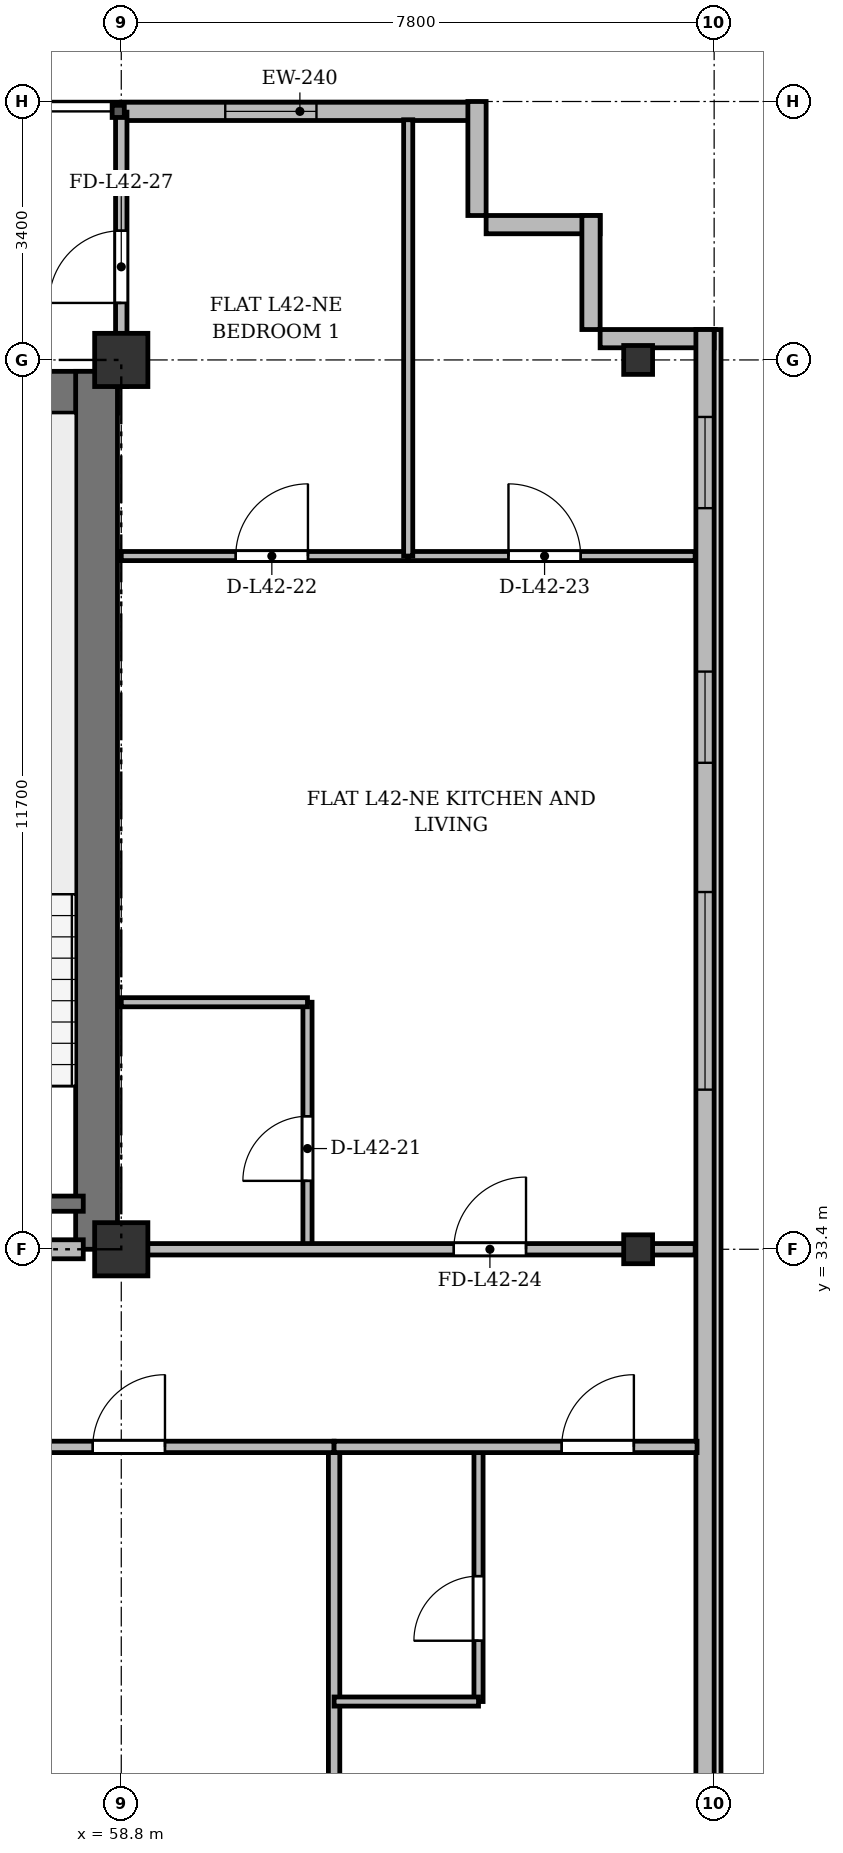
"""IFC4 building model, lengths in metres.
Left out: names, types, materials, properties, quantities, classifications, styles, units other than length and angle.
Written with IfcOpenShell. Run it as: python <this file> out.ifc"""

import sys

from ifc_helpers import new_model, si_unit, direction, frame, frame_2d, origin, origin_2d, place, context, subcontext, project, spatial, rectangle, i_section, extrude, source, transform, mapped, element, fill, save


model = new_model("IFC4")
c1 = context("Model", 3, precision=1e-05, world=origin(), true_north=direction((0.0, 1.0)))
c2 = subcontext(c1, "Body", "Model", "MODEL_VIEW")
j1 = project(units=[si_unit("LENGTHUNIT", "METRE"), si_unit("PLANEANGLEUNIT", "RADIAN")], contexts=[c1])
p1 = place(None, origin())
s1 = spatial("IfcSite", under=j1, at=p1, CompositionType="ELEMENT")
p2 = place(p1, origin())
s2 = spatial("IfcBuilding", under=s1, at=p2, CompositionType="ELEMENT")
p3 = place(p2, frame((0.0, 0.0, 160.9)))
s3 = spatial("IfcBuildingStorey", under=s2, at=p3, CompositionType="ELEMENT", Elevation=160.9)
m1 = source(origin(), c2, "Body", "SweptSolid", [
    extrude(rectangle(XDim=0.7, YDim=0.7, at=origin_2d()), origin(), (0.0, 0.0, 1.0), 3.6),
])
for number, where, z_axis, x_axis in (
    (1, (58.8, 33.4, 0.0), (0.0, 0.0, 1.0), (1.0, 0.0, 0.0)),
    (2, (58.8, 45.1, 0.0), (0.0, 0.0, 1.0), (1.0, 0.0, 0.0)),
):
    element("IfcColumn", number, at=place(p3, frame(where, z_axis=z_axis, x_axis=x_axis)), inside=s3, PredefinedType="COLUMN", context=c2, shape_type="MappedRepresentation", body=[
        mapped(m1, transform((0.0, 0.0, 0.0), x_axis=(1.0, 0.0, 0.0), y_axis=(0.0, 1.0, 0.0), z_axis=(0.0, 0.0, 1.0), scale=1.0)),
    ])
m2 = source(origin(), c2, "Body", "SweptSolid", [
    extrude(i_section(OverallWidth=0.38, OverallDepth=0.38, WebThickness=0.02, FlangeThickness=0.03, at=origin_2d()), origin(), (0.0, 0.0, 1.0), 3.6),
])
for number, where, z_axis, x_axis in (
    (3, (65.6, 33.4, 0.0), (0.0, 0.0, 1.0), (1.0, 0.0, 0.0)),
    (4, (65.6, 45.1, 0.0), (0.0, 0.0, 1.0), (1.0, 0.0, 0.0)),
):
    element("IfcColumn", number, at=place(p3, frame(where, z_axis=z_axis, x_axis=x_axis)), inside=s3, PredefinedType="COLUMN", context=c2, shape_type="MappedRepresentation", body=[
        mapped(m2, transform((0.0, 0.0, 0.0), x_axis=(1.0, 0.0, 0.0), y_axis=(0.0, 1.0, 0.0), z_axis=(0.0, 0.0, 1.0), scale=1.0)),
    ])
p4 = place(p3, frame((58.8, 48.37, 0.0), z_axis=(0.0, 0.0, 1.0), x_axis=(1.0, 0.0, 0.0)))
e5 = element("IfcWall", 5, at=p4, inside=s3, PredefinedType="SOLIDWALL", context=c2, shape_type="SweptSolid", body=[
    extrude(rectangle(XDim=4.7, YDim=0.24, at=frame_2d((2.35, 0.0))), origin(), (0.0, 0.0, 1.0), 3.35),
])
p5 = place(p4, frame((1.368, 0.0, 0.9)))
e6 = element("IfcOpeningElement", 6, at=p5, cuts=e5, PredefinedType="OPENING", context=c2, shape_type="SweptSolid", body=[
    extrude(rectangle(XDim=1.2, YDim=1.65, at=frame_2d((0.6, 0.825))), frame((0.0, 0.13, 0.0), z_axis=(0.0, -1.0, 0.0), x_axis=(1.0, 0.0, 0.0)), (0.0, 0.0, 1.0), 0.26),
])
for number, where, z_axis, x_axis in (
    (7, (63.48, 48.5, 0.0), (0.0, 0.0, 1.0), (0.0, -1.0, 0.0)),
    (8, (63.6, 46.88, 0.0), (0.0, 0.0, 1.0), (1.0, 0.0, 0.0)),
    (9, (64.98, 47.0, 0.0), (0.0, 0.0, 1.0), (0.0, -1.0, 0.0)),
    (10, (65.1, 45.38, 0.0), (0.0, 0.0, 1.0), (1.0, 0.0, 0.0)),
):
    element("IfcWall", number, at=place(p3, frame(where, z_axis=z_axis, x_axis=x_axis)), inside=s3, PredefinedType="SOLIDWALL", context=c2, shape_type="SweptSolid", body=[
        extrude(rectangle(XDim=1.5, YDim=0.24, at=frame_2d((0.75, 0.0))), origin(), (0.0, 0.0, 1.0), 3.35),
    ])
p6 = place(p3, frame((66.48, 45.5, 0.0), z_axis=(0.0, 0.0, 1.0), x_axis=(0.0, -1.0, 0.0)))
e11 = element("IfcWall", 11, at=p6, inside=s3, PredefinedType="SOLIDWALL", context=c2, shape_type="SweptSolid", body=[
    extrude(rectangle(XDim=39.2, YDim=0.24, at=frame_2d((19.6, 0.0))), origin(), (0.0, 0.0, 1.0), 3.35),
])
p7 = place(p6, frame((36.55, 0.0, 0.92)))
e12 = element("IfcOpeningElement", 12, at=p7, cuts=e11, PredefinedType="OPENING", context=c2, shape_type="SweptSolid", body=[
    extrude(rectangle(XDim=1.2, YDim=1.65, at=frame_2d((0.6, 0.825))), frame((0.0, 0.13, 0.0), z_axis=(0.0, -1.0, 0.0), x_axis=(1.0, 0.0, 0.0)), (0.0, 0.0, 1.0), 0.26),
])
p8 = place(p6, frame((32.8, 0.0, 0.92)))
e13 = element("IfcOpeningElement", 13, at=p8, cuts=e11, PredefinedType="OPENING", context=c2, shape_type="SweptSolid", body=[
    extrude(rectangle(XDim=2.6, YDim=1.9, at=frame_2d((1.3, 0.95))), frame((0.0, 0.13, 0.0), z_axis=(0.0, -1.0, 0.0), x_axis=(1.0, 0.0, 0.0)), (0.0, 0.0, 1.0), 0.26),
])
p9 = place(p6, frame((28.6, 0.0, 0.92)))
e14 = element("IfcOpeningElement", 14, at=p9, cuts=e11, PredefinedType="OPENING", context=c2, shape_type="SweptSolid", body=[
    extrude(rectangle(XDim=2.6, YDim=1.9, at=frame_2d((1.3, 0.95))), frame((0.0, 0.13, 0.0), z_axis=(0.0, -1.0, 0.0), x_axis=(1.0, 0.0, 0.0)), (0.0, 0.0, 1.0), 0.26),
])
p10 = place(p6, frame((21.4, 0.0, 0.92)))
e15 = element("IfcOpeningElement", 15, at=p10, cuts=e11, PredefinedType="OPENING", context=c2, shape_type="SweptSolid", body=[
    extrude(rectangle(XDim=2.6, YDim=1.9, at=frame_2d((1.3, 0.95))), frame((0.0, 0.13, 0.0), z_axis=(0.0, -1.0, 0.0), x_axis=(1.0, 0.0, 0.0)), (0.0, 0.0, 1.0), 0.26),
])
p11 = place(p6, frame((7.4, 0.0, 0.92)))
e16 = element("IfcOpeningElement", 16, at=p11, cuts=e11, PredefinedType="OPENING", context=c2, shape_type="SweptSolid", body=[
    extrude(rectangle(XDim=2.6, YDim=1.9, at=frame_2d((1.3, 0.95))), frame((0.0, 0.13, 0.0), z_axis=(0.0, -1.0, 0.0), x_axis=(1.0, 0.0, 0.0)), (0.0, 0.0, 1.0), 0.26),
])
p12 = place(p6, frame((4.5, 0.0, 0.92)))
e17 = element("IfcOpeningElement", 17, at=p12, cuts=e11, PredefinedType="OPENING", context=c2, shape_type="SweptSolid", body=[
    extrude(rectangle(XDim=1.2, YDim=1.65, at=frame_2d((0.6, 0.825))), frame((0.0, 0.13, 0.0), z_axis=(0.0, -1.0, 0.0), x_axis=(1.0, 0.0, 0.0)), (0.0, 0.0, 1.0), 0.26),
])
p13 = place(p6, frame((1.15, 0.0, 0.92)))
e18 = element("IfcOpeningElement", 18, at=p13, cuts=e11, PredefinedType="OPENING", context=c2, shape_type="SweptSolid", body=[
    extrude(rectangle(XDim=1.2, YDim=1.65, at=frame_2d((0.6, 0.825))), frame((0.0, 0.13, 0.0), z_axis=(0.0, -1.0, 0.0), x_axis=(1.0, 0.0, 0.0)), (0.0, 0.0, 1.0), 0.26),
])
p14 = place(p3, frame((15.65, 44.675, 0.0), z_axis=(0.0, 0.0, 1.0), x_axis=(1.0, 0.0, 0.0)))
e19 = element("IfcWall", 19, at=p14, inside=s3, PredefinedType="SHEAR", context=c2, shape_type="SweptSolid", body=[
    extrude(rectangle(XDim=43.1, YDim=0.55, at=frame_2d((21.55, 0.0))), origin(), (0.0, 0.0, 1.0), 3.35),
])
p15 = place(p3, frame((58.475, 33.4, 0.0), z_axis=(0.0, 0.0, 1.0), x_axis=(0.0, 1.0, 0.0)))
e20 = element("IfcWall", 20, at=p15, inside=s3, PredefinedType="SHEAR", context=c2, shape_type="SweptSolid", body=[
    extrude(rectangle(XDim=11.55, YDim=0.55, at=frame_2d((5.775, 0.0))), origin(), (0.0, 0.0, 1.0), 3.35),
])
p16 = place(p3, frame((54.9, 34.0, 0.0), z_axis=(0.0, 0.0, 1.0), x_axis=(1.0, 0.0, 0.0)))
e21 = element("IfcWall", 21, at=p16, inside=s3, PredefinedType="SHEAR", context=c2, shape_type="SweptSolid", body=[
    extrude(rectangle(XDim=3.4, YDim=0.2, at=frame_2d((1.7, 0.0))), origin(), (0.0, 0.0, 1.0), 3.35),
])
p17 = place(p3, frame((47.15, 33.4, 0.0), z_axis=(0.0, 0.0, 1.0), x_axis=(1.0, 0.0, 0.0)))
e22 = element("IfcWall", 22, at=p17, inside=s3, PredefinedType="PARTITIONING", context=c2, shape_type="SweptSolid", body=[
    extrude(rectangle(XDim=11.15, YDim=0.25, at=frame_2d((5.575, 0.0))), origin(), (0.0, 0.0, 1.0), 2.75),
])
p18 = place(p17, frame((0.7, 0.0, 0.0)))
e23 = element("IfcOpeningElement", 23, at=p18, cuts=e22, PredefinedType="OPENING", context=c2, shape_type="SweptSolid", body=[
    extrude(rectangle(XDim=0.95, YDim=2.15, at=frame_2d((0.475, 1.075))), frame((0.0, 0.135, 0.0), z_axis=(0.0, -1.0, 0.0), x_axis=(1.0, 0.0, 0.0)), (0.0, 0.0, 1.0), 0.27),
])
p19 = place(p17, frame((6.0, 0.0, 0.0)))
e24 = element("IfcOpeningElement", 24, at=p19, cuts=e22, PredefinedType="OPENING", context=c2, shape_type="SweptSolid", body=[
    extrude(rectangle(XDim=1.2, YDim=2.15, at=frame_2d((0.6, 1.075))), frame((0.0, 0.135, 0.0), z_axis=(0.0, -1.0, 0.0), x_axis=(1.0, 0.0, 0.0)), (0.0, 0.0, 1.0), 0.27),
])
p20 = place(p3, frame((61.25, 33.4, 0.0), z_axis=(0.0, 0.0, 1.0), x_axis=(0.0, 1.0, 0.0)))
e25 = element("IfcWall", 25, at=p20, inside=s3, PredefinedType="PARTITIONING", context=c2, shape_type="SweptSolid", body=[
    extrude(rectangle(XDim=3.25, YDim=0.12, at=frame_2d((1.625, 0.0))), origin(), (0.0, 0.0, 1.0), 2.75),
])
p21 = place(p20, frame((0.9, 0.0, 0.0)))
e26 = element("IfcOpeningElement", 26, at=p21, cuts=e25, PredefinedType="OPENING", context=c2, shape_type="SweptSolid", body=[
    extrude(rectangle(XDim=0.85, YDim=2.1, at=frame_2d((0.425, 1.05))), frame((0.0, 0.07, 0.0), z_axis=(0.0, -1.0, 0.0), x_axis=(1.0, 0.0, 0.0)), (0.0, 0.0, 1.0), 0.14),
])
p22 = place(p3, frame((58.8, 36.65, 0.0), z_axis=(0.0, 0.0, 1.0), x_axis=(1.0, 0.0, 0.0)))
e27 = element("IfcWall", 27, at=p22, inside=s3, PredefinedType="PARTITIONING", context=c2, shape_type="SweptSolid", body=[
    extrude(rectangle(XDim=2.45, YDim=0.12, at=frame_2d((1.225, 0.0))), origin(), (0.0, 0.0, 1.0), 2.85),
])
p23 = place(p3, frame((58.8, 42.52, 0.0), z_axis=(0.0, 0.0, 1.0), x_axis=(1.0, 0.0, 0.0)))
e28 = element("IfcWall", 28, at=p23, inside=s3, PredefinedType="PARTITIONING", context=c2, shape_type="SweptSolid", body=[
    extrude(rectangle(XDim=3.775, YDim=0.12, at=frame_2d((1.887, 0.0))), origin(), (0.0, 0.0, 1.0), 2.85),
])
p24 = place(p23, frame((1.506, 0.0, 0.0)))
e29 = element("IfcOpeningElement", 29, at=p24, cuts=e28, PredefinedType="OPENING", context=c2, shape_type="SweptSolid", body=[
    extrude(rectangle(XDim=0.95, YDim=2.15, at=frame_2d((0.475, 1.075))), frame((0.0, 0.07, 0.0), z_axis=(0.0, -1.0, 0.0), x_axis=(1.0, 0.0, 0.0)), (0.0, 0.0, 1.0), 0.14),
])
p25 = place(p3, frame((62.575, 42.52, 0.0), z_axis=(0.0, 0.0, 1.0), x_axis=(1.0, 0.0, 0.0)))
e30 = element("IfcWall", 30, at=p25, inside=s3, PredefinedType="PARTITIONING", context=c2, shape_type="SweptSolid", body=[
    extrude(rectangle(XDim=3.775, YDim=0.12, at=frame_2d((1.888, 0.0))), origin(), (0.0, 0.0, 1.0), 2.85),
])
p26 = place(p25, frame((1.319, 0.0, 0.0)))
e31 = element("IfcOpeningElement", 31, at=p26, cuts=e30, PredefinedType="OPENING", context=c2, shape_type="SweptSolid", body=[
    extrude(rectangle(XDim=0.95, YDim=2.15, at=frame_2d((0.475, 1.075))), frame((0.0, 0.07, 0.0), z_axis=(0.0, -1.0, 0.0), x_axis=(1.0, 0.0, 0.0)), (0.0, 0.0, 1.0), 0.14),
])
p27 = place(p3, frame((62.575, 42.52, 0.0), z_axis=(0.0, 0.0, 1.0), x_axis=(0.0, 1.0, 0.0)))
e32 = element("IfcWall", 32, at=p27, inside=s3, PredefinedType="PARTITIONING", context=c2, shape_type="SweptSolid", body=[
    extrude(rectangle(XDim=5.74, YDim=0.12, at=frame_2d((2.87, 0.0))), origin(), (0.0, 0.0, 1.0), 2.75),
])
p28 = place(p3, frame((58.8, 33.4, 0.0), z_axis=(0.0, 0.0, 1.0), x_axis=(1.0, 0.0, 0.0)))
e33 = element("IfcWall", 33, at=p28, inside=s3, PredefinedType="PARTITIONING", context=c2, shape_type="SweptSolid", body=[
    extrude(rectangle(XDim=7.55, YDim=0.15, at=frame_2d((3.775, 0.0))), origin(), (0.0, 0.0, 1.0), 2.75),
])
p29 = place(p28, frame((4.375, 0.0, 0.0)))
e34 = element("IfcOpeningElement", 34, at=p29, cuts=e33, PredefinedType="OPENING", context=c2, shape_type="SweptSolid", body=[
    extrude(rectangle(XDim=0.95, YDim=2.15, at=frame_2d((0.475, 1.075))), frame((0.0, 0.085, 0.0), z_axis=(0.0, -1.0, 0.0), x_axis=(1.0, 0.0, 0.0)), (0.0, 0.0, 1.0), 0.17),
])
p30 = place(p3, frame((58.8, 44.75, 0.0), z_axis=(0.0, 0.0, 1.0), x_axis=(0.0, 1.0, 0.0)))
e35 = element("IfcWall", 35, at=p30, inside=s3, PredefinedType="PARTITIONING", context=c2, shape_type="SweptSolid", body=[
    extrude(rectangle(XDim=3.61, YDim=0.15, at=frame_2d((1.805, 0.0))), origin(), (0.0, 0.0, 1.0), 2.85),
])
p31 = place(p30, frame((1.1, 0.0, 0.0)))
e36 = element("IfcOpeningElement", 36, at=p31, cuts=e35, PredefinedType="OPENING", context=c2, shape_type="SweptSolid", body=[
    extrude(rectangle(XDim=0.95, YDim=2.15, at=frame_2d((0.475, 1.075))), frame((0.0, 0.085, 0.0), z_axis=(0.0, -1.0, 0.0), x_axis=(1.0, 0.0, 0.0)), (0.0, 0.0, 1.0), 0.17),
])
p32 = place(p3, frame((61.6, 3.525, 0.0), z_axis=(0.0, 0.0, 1.0), x_axis=(0.0, 1.0, 0.0)))
e37 = element("IfcWall", 37, at=p32, inside=s3, PredefinedType="PARTITIONING", context=c2, shape_type="SweptSolid", body=[
    extrude(rectangle(XDim=27.275, YDim=0.15, at=frame_2d((13.638, 0.0))), origin(), (0.0, 0.0, 1.0), 2.75),
])
p33 = place(p3, frame((56.2, 30.8, 0.0), z_axis=(0.0, 0.0, 1.0), x_axis=(1.0, 0.0, 0.0)))
e38 = element("IfcWall", 38, at=p33, inside=s3, PredefinedType="PARTITIONING", context=c2, shape_type="SweptSolid", body=[
    extrude(rectangle(XDim=5.4, YDim=0.15, at=frame_2d((2.7, 0.0))), origin(), (0.0, 0.0, 1.0), 2.85),
])
p34 = place(p33, frame((2.225, 0.0, 0.0)))
e39 = element("IfcOpeningElement", 39, at=p34, cuts=e38, PredefinedType="OPENING", context=c2, shape_type="SweptSolid", body=[
    extrude(rectangle(XDim=0.95, YDim=2.15, at=frame_2d((0.475, 1.075))), frame((0.0, 0.085, 0.0), z_axis=(0.0, -1.0, 0.0), x_axis=(1.0, 0.0, 0.0)), (0.0, 0.0, 1.0), 0.17),
])
p35 = place(p3, frame((63.5, 27.45, 0.0), z_axis=(0.0, 0.0, 1.0), x_axis=(0.0, 1.0, 0.0)))
e40 = element("IfcWall", 40, at=p35, inside=s3, PredefinedType="PARTITIONING", context=c2, shape_type="SweptSolid", body=[
    extrude(rectangle(XDim=3.35, YDim=0.12, at=frame_2d((1.675, 0.0))), origin(), (0.0, 0.0, 1.0), 3.35),
])
p36 = place(p35, frame((0.8, 0.0, 0.0)))
e41 = element("IfcOpeningElement", 41, at=p36, cuts=e40, PredefinedType="OPENING", context=c2, shape_type="SweptSolid", body=[
    extrude(rectangle(XDim=0.85, YDim=2.1, at=frame_2d((0.425, 1.05))), frame((0.0, 0.07, 0.0), z_axis=(0.0, -1.0, 0.0), x_axis=(1.0, 0.0, 0.0)), (0.0, 0.0, 1.0), 0.14),
])
p37 = place(p3, frame((61.6, 27.45, 0.0), z_axis=(0.0, 0.0, 1.0), x_axis=(1.0, 0.0, 0.0)))
e42 = element("IfcWall", 42, at=p37, inside=s3, PredefinedType="PARTITIONING", context=c2, shape_type="SweptSolid", body=[
    extrude(rectangle(XDim=1.9, YDim=0.12, at=frame_2d((0.95, 0.0))), origin(), (0.0, 0.0, 1.0), 3.35),
])
p38 = place(p3, frame((61.6, 30.8, 0.0), z_axis=(0.0, 0.0, 1.0), x_axis=(1.0, 0.0, 0.0)))
e43 = element("IfcWall", 43, at=p38, inside=s3, PredefinedType="PARTITIONING", context=c2, shape_type="SweptSolid", body=[
    extrude(rectangle(XDim=4.775, YDim=0.15, at=frame_2d((2.387, 0.0))), origin(), (0.0, 0.0, 1.0), 2.85),
])
p39 = place(p38, frame((2.994, 0.0, 0.0)))
e44 = element("IfcOpeningElement", 44, at=p39, cuts=e43, PredefinedType="OPENING", context=c2, shape_type="SweptSolid", body=[
    extrude(rectangle(XDim=0.95, YDim=2.15, at=frame_2d((0.475, 1.075))), frame((0.0, 0.085, 0.0), z_axis=(0.0, -1.0, 0.0), x_axis=(1.0, 0.0, 0.0)), (0.0, 0.0, 1.0), 0.17),
])
m3 = source(origin(), c2, "Body", "SweptSolid", [
    extrude(rectangle(XDim=1.2, YDim=1.65, at=frame_2d((0.6, 0.825))), frame((0.0, 0.03, 0.0), z_axis=(0.0, -1.0, 0.0), x_axis=(1.0, 0.0, 0.0)), (0.0, 0.0, 1.0), 0.06),
])
p40 = place(p5, origin())
e45 = element("IfcWindow", 45, at=p40, inside=s3, PartitioningType="SINGLE_PANEL", PredefinedType="WINDOW", context=c2, shape_type="MappedRepresentation", body=[
    mapped(m3, transform((0.0, 0.0, 0.0), x_axis=(1.0, 0.0, 0.0), y_axis=(0.0, 1.0, 0.0), z_axis=(0.0, 0.0, 1.0), scale=1.0)),
])
fill(e6, e45)
m4 = source(origin(), c2, "Body", "SweptSolid", [
    extrude(rectangle(XDim=2.6, YDim=1.9, at=frame_2d((1.3, 0.95))), frame((0.0, 0.03, 0.0), z_axis=(0.0, -1.0, 0.0), x_axis=(1.0, 0.0, 0.0)), (0.0, 0.0, 1.0), 0.06),
])
p41 = place(p11, origin())
e46 = element("IfcWindow", 46, at=p41, inside=s3, PartitioningType="SINGLE_PANEL", PredefinedType="WINDOW", context=c2, shape_type="MappedRepresentation", body=[
    mapped(m4, transform((0.0, 0.0, 0.0), x_axis=(1.0, 0.0, 0.0), y_axis=(0.0, 1.0, 0.0), z_axis=(0.0, 0.0, 1.0), scale=1.0)),
])
fill(e16, e46)
p42 = place(p12, origin())
e47 = element("IfcWindow", 47, at=p42, inside=s3, PartitioningType="SINGLE_PANEL", PredefinedType="WINDOW", context=c2, shape_type="MappedRepresentation", body=[
    mapped(m3, transform((0.0, 0.0, 0.0), x_axis=(1.0, 0.0, 0.0), y_axis=(0.0, 1.0, 0.0), z_axis=(0.0, 0.0, 1.0), scale=1.0)),
])
fill(e17, e47)
p43 = place(p13, origin())
e48 = element("IfcWindow", 48, at=p43, inside=s3, PartitioningType="SINGLE_PANEL", PredefinedType="WINDOW", context=c2, shape_type="MappedRepresentation", body=[
    mapped(m3, transform((0.0, 0.0, 0.0), x_axis=(1.0, 0.0, 0.0), y_axis=(0.0, 1.0, 0.0), z_axis=(0.0, 0.0, 1.0), scale=1.0)),
])
fill(e18, e48)
m5 = source(origin(), c2, "Body", "SweptSolid", [
    extrude(rectangle(XDim=0.85, YDim=2.1, at=frame_2d((0.425, 1.05))), frame((0.0, 0.025, 0.0), z_axis=(0.0, -1.0, 0.0), x_axis=(1.0, 0.0, 0.0)), (0.0, 0.0, 1.0), 0.05),
])
p44 = place(p21, origin())
e49 = element("IfcDoor", 49, at=p44, inside=s3, OperationType="SINGLE_SWING_LEFT", PredefinedType="DOOR", context=c2, shape_type="MappedRepresentation", body=[
    mapped(m5, transform((0.0, 0.0, 0.0), x_axis=(1.0, 0.0, 0.0), y_axis=(0.0, 1.0, 0.0), z_axis=(0.0, 0.0, 1.0), scale=1.0)),
])
fill(e26, e49)
m6 = source(origin(), c2, "Body", "SweptSolid", [
    extrude(rectangle(XDim=0.95, YDim=2.15, at=frame_2d((0.475, 1.075))), frame((0.0, 0.025, 0.0), z_axis=(0.0, -1.0, 0.0), x_axis=(1.0, 0.0, 0.0)), (0.0, 0.0, 1.0), 0.05),
])
p45 = place(p24, origin())
e50 = element("IfcDoor", 50, at=p45, inside=s3, OperationType="SINGLE_SWING_RIGHT", PredefinedType="DOOR", context=c2, shape_type="MappedRepresentation", body=[
    mapped(m6, transform((0.0, 0.0, 0.0), x_axis=(1.0, 0.0, 0.0), y_axis=(0.0, 1.0, 0.0), z_axis=(0.0, 0.0, 1.0), scale=1.0)),
])
fill(e29, e50)
p46 = place(p26, origin())
e51 = element("IfcDoor", 51, at=p46, inside=s3, OperationType="SINGLE_SWING_LEFT", PredefinedType="DOOR", context=c2, shape_type="MappedRepresentation", body=[
    mapped(m6, transform((0.0, 0.0, 0.0), x_axis=(1.0, 0.0, 0.0), y_axis=(0.0, 1.0, 0.0), z_axis=(0.0, 0.0, 1.0), scale=1.0)),
])
fill(e31, e51)
p47 = place(p29, origin())
e52 = element("IfcDoor", 52, at=p47, inside=s3, OperationType="SINGLE_SWING_RIGHT", PredefinedType="DOOR", context=c2, shape_type="MappedRepresentation", body=[
    mapped(m6, transform((0.0, 0.0, 0.0), x_axis=(1.0, 0.0, 0.0), y_axis=(0.0, 1.0, 0.0), z_axis=(0.0, 0.0, 1.0), scale=1.0)),
])
fill(e34, e52)
p48 = place(p31, origin())
e53 = element("IfcDoor", 53, at=p48, inside=s3, OperationType="SINGLE_SWING_LEFT", PredefinedType="DOOR", context=c2, shape_type="MappedRepresentation", body=[
    mapped(m6, transform((0.0, 0.0, 0.0), x_axis=(1.0, 0.0, 0.0), y_axis=(0.0, 1.0, 0.0), z_axis=(0.0, 0.0, 1.0), scale=1.0)),
])
fill(e36, e53)
p49 = place(p34, origin())
e54 = element("IfcDoor", 54, at=p49, inside=s3, OperationType="SINGLE_SWING_RIGHT", PredefinedType="DOOR", context=c2, shape_type="MappedRepresentation", body=[
    mapped(m6, transform((0.0, 0.0, 0.0), x_axis=(1.0, 0.0, 0.0), y_axis=(0.0, 1.0, 0.0), z_axis=(0.0, 0.0, 1.0), scale=1.0)),
])
fill(e39, e54)
p50 = place(p36, origin())
e55 = element("IfcDoor", 55, at=p50, inside=s3, OperationType="SINGLE_SWING_LEFT", PredefinedType="DOOR", context=c2, shape_type="MappedRepresentation", body=[
    mapped(m5, transform((0.0, 0.0, 0.0), x_axis=(1.0, 0.0, 0.0), y_axis=(0.0, 1.0, 0.0), z_axis=(0.0, 0.0, 1.0), scale=1.0)),
])
fill(e41, e55)
p51 = place(p39, origin())
e56 = element("IfcDoor", 56, at=p51, inside=s3, OperationType="SINGLE_SWING_RIGHT", PredefinedType="DOOR", context=c2, shape_type="MappedRepresentation", body=[
    mapped(m6, transform((0.0, 0.0, 0.0), x_axis=(1.0, 0.0, 0.0), y_axis=(0.0, 1.0, 0.0), z_axis=(0.0, 0.0, 1.0), scale=1.0)),
])
fill(e44, e56)
save(model, sys.argv[1])
